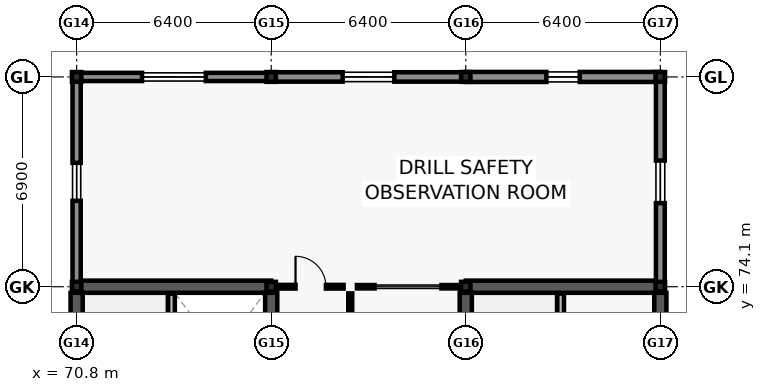
"""IFC4 building model, lengths in metres.
Left out: names, types, materials, properties, quantities, classifications, styles, units other than length and angle.
Written with IfcOpenShell. Run it as: python <this file> out.ifc"""

import sys

from ifc_helpers import new_model, si_unit, direction, frame, frame_2d, origin, origin_2d, place, context, subcontext, project, spatial, rectangle, i_section, extrude, element, fill, save


model = new_model("IFC4")
c1 = context("Model", 3, precision=1e-05, world=origin(), true_north=direction((0.0, 1.0)))
c2 = subcontext(c1, "Body", "Model", "MODEL_VIEW")
j1 = project(units=[si_unit("LENGTHUNIT", "METRE"), si_unit("PLANEANGLEUNIT", "RADIAN")], contexts=[c1])
p1 = place(None, origin())
s1 = spatial("IfcSite", under=j1, at=p1, CompositionType="ELEMENT")
p2 = place(p1, origin())
s2 = spatial("IfcBuilding", under=s1, at=p2, CompositionType="ELEMENT")
p3 = place(p2, frame((0.0, 0.0, 9.6)))
s3 = spatial("IfcBuildingStorey", under=s2, at=p3, CompositionType="ELEMENT", Elevation=9.6)
for number, where, z_axis, x_axis in (
    (1, (70.8, 74.1, 0.0), (0.0, 0.0, 1.0), (1.0, 0.0, 0.0)),
    (2, (70.8, 81.0, 0.0), (0.0, 0.0, 1.0), (1.0, 0.0, 0.0)),
    (3, (77.2, 74.1, 0.0), (0.0, 0.0, 1.0), (1.0, 0.0, 0.0)),
    (4, (77.2, 81.0, 0.0), (0.0, 0.0, 1.0), (1.0, 0.0, 0.0)),
    (5, (83.6, 74.1, 0.0), (0.0, 0.0, 1.0), (1.0, 0.0, 0.0)),
    (6, (83.6, 81.0, 0.0), (0.0, 0.0, 1.0), (1.0, 0.0, 0.0)),
    (7, (90.0, 74.1, 0.0), (0.0, 0.0, 1.0), (1.0, 0.0, 0.0)),
    (8, (90.0, 81.0, 0.0), (0.0, 0.0, 1.0), (1.0, 0.0, 0.0)),
):
    element("IfcColumn", number, at=place(p3, frame(where, z_axis=z_axis, x_axis=x_axis)), inside=s3, PredefinedType="COLUMN", context=c2, shape_type="SweptSolid", body=[
        extrude(i_section(OverallWidth=0.309, OverallDepth=0.321, WebThickness=0.014, FlangeThickness=0.022, FilletRadius=0.017, at=origin_2d()), origin(), (0.0, 0.0, 1.0), 3.9),
    ])
p4 = place(p3, frame((70.8, 74.1, 0.0), z_axis=(0.0, 0.0, 1.0), x_axis=(1.0, 0.0, 0.0)))
e9 = element("IfcWall", 9, at=p4, inside=s3, PredefinedType="SHEAR", context=c2, shape_type="SweptSolid", body=[
    extrude(rectangle(XDim=6.4, YDim=0.4, at=frame_2d((3.2, 0.0))), origin(), (0.0, 0.0, 1.0), 3.66),
])
for number, where, z_axis, x_axis in (
    (10, (70.8, 67.2, 0.0), (0.0, 0.0, 1.0), (0.0, 1.0, 0.0)),
    (11, (77.2, 67.2, 0.0), (0.0, 0.0, 1.0), (0.0, 1.0, 0.0)),
):
    element("IfcWall", number, at=place(p3, frame(where, z_axis=z_axis, x_axis=x_axis)), inside=s3, PredefinedType="SHEAR", context=c2, shape_type="SweptSolid", body=[
        extrude(rectangle(XDim=6.7, YDim=0.4, at=frame_2d((3.35, 0.0))), origin(), (0.0, 0.0, 1.0), 3.66),
    ])
p5 = place(p3, frame((83.6, 74.1, 0.0), z_axis=(0.0, 0.0, 1.0), x_axis=(1.0, 0.0, 0.0)))
e12 = element("IfcWall", 12, at=p5, inside=s3, PredefinedType="SHEAR", context=c2, shape_type="SweptSolid", body=[
    extrude(rectangle(XDim=6.4, YDim=0.4, at=frame_2d((3.2, 0.0))), origin(), (0.0, 0.0, 1.0), 3.66),
])
for number, where, z_axis, x_axis in (
    (13, (83.6, 67.2, 0.0), (0.0, 0.0, 1.0), (0.0, 1.0, 0.0)),
    (14, (90.0, 67.2, 0.0), (0.0, 0.0, 1.0), (0.0, 1.0, 0.0)),
):
    element("IfcWall", number, at=place(p3, frame(where, z_axis=z_axis, x_axis=x_axis)), inside=s3, PredefinedType="SHEAR", context=c2, shape_type="SweptSolid", body=[
        extrude(rectangle(XDim=6.7, YDim=0.4, at=frame_2d((3.35, 0.0))), origin(), (0.0, 0.0, 1.0), 3.66),
    ])
p6 = place(p3, frame((70.805, 81.0, 0.0), z_axis=(0.0, 0.0, 1.0), x_axis=(1.0, 0.0, 0.0)))
e15 = element("IfcWall", 15, at=p6, inside=s3, PredefinedType="SOLIDWALL", context=c2, shape_type="SweptSolid", body=[
    extrude(rectangle(XDim=6.39, YDim=0.27, at=frame_2d((3.195, 0.0))), origin(), (0.0, 0.0, 1.0), 3.02),
])
p7 = place(p6, frame((2.145, 0.0, 0.8)))
e16 = element("IfcOpeningElement", 16, at=p7, cuts=e15, PredefinedType="OPENING", context=c2, shape_type="SweptSolid", body=[
    extrude(rectangle(XDim=2.1, YDim=1.25, at=frame_2d((1.05, 0.625))), frame((0.0, 0.145, 0.0), z_axis=(0.0, -1.0, 0.0), x_axis=(1.0, 0.0, 0.0)), (0.0, 0.0, 1.0), 0.29),
])
p8 = place(p3, frame((77.205, 81.0, 0.0), z_axis=(0.0, 0.0, 1.0), x_axis=(1.0, 0.0, 0.0)))
e17 = element("IfcWall", 17, at=p8, inside=s3, PredefinedType="SOLIDWALL", context=c2, shape_type="SweptSolid", body=[
    extrude(rectangle(XDim=6.39, YDim=0.31, at=frame_2d((3.195, 0.0))), origin(), (0.0, 0.0, 1.0), 3.02),
])
p9 = place(p8, frame((2.345, 0.0, 0.8)))
e18 = element("IfcOpeningElement", 18, at=p9, cuts=e17, PredefinedType="OPENING", context=c2, shape_type="SweptSolid", body=[
    extrude(rectangle(XDim=1.7, YDim=1.25, at=frame_2d((0.85, 0.625))), frame((0.0, 0.165, 0.0), z_axis=(0.0, -1.0, 0.0), x_axis=(1.0, 0.0, 0.0)), (0.0, 0.0, 1.0), 0.33),
])
p10 = place(p3, frame((83.605, 81.0, 0.0), z_axis=(0.0, 0.0, 1.0), x_axis=(1.0, 0.0, 0.0)))
e19 = element("IfcWall", 19, at=p10, inside=s3, PredefinedType="SOLIDWALL", context=c2, shape_type="SweptSolid", body=[
    extrude(rectangle(XDim=6.39, YDim=0.33, at=frame_2d((3.195, 0.0))), origin(), (0.0, 0.0, 1.0), 3.02),
])
p11 = place(p10, frame((2.645, 0.0, 0.8)))
e20 = element("IfcOpeningElement", 20, at=p11, cuts=e19, PredefinedType="OPENING", context=c2, shape_type="SweptSolid", body=[
    extrude(rectangle(XDim=1.1, YDim=1.5, at=frame_2d((0.55, 0.75))), frame((0.0, 0.175, 0.0), z_axis=(0.0, -1.0, 0.0), x_axis=(1.0, 0.0, 0.0)), (0.0, 0.0, 1.0), 0.35),
])
p12 = place(p3, frame((70.8, 74.105, 0.0), z_axis=(0.0, 0.0, 1.0), x_axis=(0.0, 1.0, 0.0)))
e21 = element("IfcWall", 21, at=p12, inside=s3, PredefinedType="SOLIDWALL", context=c2, shape_type="SweptSolid", body=[
    extrude(rectangle(XDim=6.89, YDim=0.27, at=frame_2d((3.445, 0.0))), origin(), (0.0, 0.0, 1.0), 3.02),
])
p13 = place(p12, frame((2.82, 0.0, 0.8)))
e22 = element("IfcOpeningElement", 22, at=p13, cuts=e21, PredefinedType="OPENING", context=c2, shape_type="SweptSolid", body=[
    extrude(rectangle(XDim=1.25, YDim=1.5, at=frame_2d((0.625, 0.75))), frame((0.0, 0.145, 0.0), z_axis=(0.0, -1.0, 0.0), x_axis=(1.0, 0.0, 0.0)), (0.0, 0.0, 1.0), 0.29),
])
p14 = place(p3, frame((90.0, 80.995, 0.0), z_axis=(0.0, 0.0, 1.0), x_axis=(0.0, -1.0, 0.0)))
e23 = element("IfcWall", 23, at=p14, inside=s3, PredefinedType="SOLIDWALL", context=c2, shape_type="SweptSolid", body=[
    extrude(rectangle(XDim=6.89, YDim=0.29, at=frame_2d((3.445, 0.0))), origin(), (0.0, 0.0, 1.0), 3.02),
])
p15 = place(p14, frame((2.745, 0.0, 0.8)))
e24 = element("IfcOpeningElement", 24, at=p15, cuts=e23, PredefinedType="OPENING", context=c2, shape_type="SweptSolid", body=[
    extrude(rectangle(XDim=1.4, YDim=1.5, at=frame_2d((0.7, 0.75))), frame((0.0, 0.155, 0.0), z_axis=(0.0, -1.0, 0.0), x_axis=(1.0, 0.0, 0.0)), (0.0, 0.0, 1.0), 0.31),
])
for number, where, z_axis, x_axis in (
    (25, (73.92, 67.32, 0.0), (0.0, 0.0, 1.0), (0.0, 1.0, 0.0)),
    (26, (86.72, 67.32, 0.0), (0.0, 0.0, 1.0), (0.0, 1.0, 0.0)),
):
    element("IfcWall", number, at=place(p3, frame(where, z_axis=z_axis, x_axis=x_axis)), inside=s3, PredefinedType="SOLIDWALL", context=c2, shape_type="SweptSolid", body=[
        extrude(rectangle(XDim=6.555, YDim=0.22, at=frame_2d((3.277, 0.0))), origin(), (0.0, 0.0, 1.0), 3.66),
    ])
p16 = place(p3, frame((79.8, 67.42, 0.0), z_axis=(0.0, 0.0, 1.0), x_axis=(0.0, 1.0, 0.0)))
e27 = element("IfcWall", 27, at=p16, inside=s3, PredefinedType="PARTITIONING", context=c2, shape_type="SweptSolid", body=[
    extrude(rectangle(XDim=6.46, YDim=0.13, at=frame_2d((3.23, 0.0))), origin(), (0.0, 0.0, 1.0), 3.0),
])
p17 = place(p16, frame((2.745, 0.0, 0.0)))
e28 = element("IfcOpeningElement", 28, at=p17, cuts=e27, PredefinedType="OPENING", context=c2, shape_type="SweptSolid", body=[
    extrude(rectangle(XDim=0.97, YDim=2.1, at=frame_2d((0.485, 1.05))), frame((0.0, 0.075, 0.0), z_axis=(0.0, -1.0, 0.0), x_axis=(1.0, 0.0, 0.0)), (0.0, 0.0, 1.0), 0.15),
])
p18 = place(p3, frame((77.42, 74.1, 0.0), z_axis=(0.0, 0.0, 1.0), x_axis=(1.0, 0.0, 0.0)))
e29 = element("IfcWall", 29, at=p18, inside=s3, PredefinedType="PARTITIONING", context=c2, shape_type="SweptSolid", body=[
    extrude(rectangle(XDim=2.16, YDim=0.12, at=frame_2d((1.08, 0.0))), origin(), (0.0, 0.0, 1.0), 3.0),
])
p19 = place(p18, frame((0.58, 0.0, 0.0)))
e30 = element("IfcOpeningElement", 30, at=p19, cuts=e29, PredefinedType="OPENING", context=c2, shape_type="SweptSolid", body=[
    extrude(rectangle(XDim=1.0, YDim=2.12, at=frame_2d((0.5, 1.06))), frame((0.0, 0.07, 0.0), z_axis=(0.0, -1.0, 0.0), x_axis=(1.0, 0.0, 0.0)), (0.0, 0.0, 1.0), 0.14),
])
p20 = place(p3, frame((80.02, 74.1, 0.0), z_axis=(0.0, 0.0, 1.0), x_axis=(1.0, 0.0, 0.0)))
e31 = element("IfcWall", 31, at=p20, inside=s3, PredefinedType="PARTITIONING", context=c2, shape_type="SweptSolid", body=[
    extrude(rectangle(XDim=3.36, YDim=0.11, at=frame_2d((1.68, 0.0))), origin(), (0.0, 0.0, 1.0), 3.0),
])
p21 = place(p20, frame((0.58, 0.0, 0.95)))
e32 = element("IfcOpeningElement", 32, at=p21, cuts=e31, PredefinedType="OPENING", context=c2, shape_type="SweptSolid", body=[
    extrude(rectangle(XDim=2.2, YDim=1.3, at=frame_2d((1.1, 0.65))), frame((0.0, 0.065, 0.0), z_axis=(0.0, -1.0, 0.0), x_axis=(1.0, 0.0, 0.0)), (0.0, 0.0, 1.0), 0.13),
])
p22 = place(p7, origin())
e33 = element("IfcWindow", 33, at=p22, inside=s3, PartitioningType="DOUBLE_PANEL_VERTICAL", PredefinedType="WINDOW", context=c2, shape_type="SweptSolid", body=[
    extrude(rectangle(XDim=2.1, YDim=1.25, at=frame_2d((1.05, 0.625))), frame((0.0, 0.03, 0.0), z_axis=(0.0, -1.0, 0.0), x_axis=(1.0, 0.0, 0.0)), (0.0, 0.0, 1.0), 0.06),
])
fill(e16, e33)
p23 = place(p9, origin())
e34 = element("IfcWindow", 34, at=p23, inside=s3, PartitioningType="DOUBLE_PANEL_VERTICAL", PredefinedType="WINDOW", context=c2, shape_type="SweptSolid", body=[
    extrude(rectangle(XDim=1.7, YDim=1.25, at=frame_2d((0.85, 0.625))), frame((0.0, 0.03, 0.0), z_axis=(0.0, -1.0, 0.0), x_axis=(1.0, 0.0, 0.0)), (0.0, 0.0, 1.0), 0.06),
])
fill(e18, e34)
p24 = place(p11, origin())
e35 = element("IfcWindow", 35, at=p24, inside=s3, PartitioningType="SINGLE_PANEL", PredefinedType="WINDOW", context=c2, shape_type="SweptSolid", body=[
    extrude(rectangle(XDim=1.1, YDim=1.5, at=frame_2d((0.55, 0.75))), frame((0.0, 0.03, 0.0), z_axis=(0.0, -1.0, 0.0), x_axis=(1.0, 0.0, 0.0)), (0.0, 0.0, 1.0), 0.06),
])
fill(e20, e35)
p25 = place(p13, origin())
e36 = element("IfcWindow", 36, at=p25, inside=s3, PartitioningType="SINGLE_PANEL", PredefinedType="WINDOW", context=c2, shape_type="SweptSolid", body=[
    extrude(rectangle(XDim=1.25, YDim=1.5, at=frame_2d((0.625, 0.75))), frame((0.0, 0.03, 0.0), z_axis=(0.0, -1.0, 0.0), x_axis=(1.0, 0.0, 0.0)), (0.0, 0.0, 1.0), 0.06),
])
fill(e22, e36)
p26 = place(p15, origin())
e37 = element("IfcWindow", 37, at=p26, inside=s3, PartitioningType="SINGLE_PANEL", PredefinedType="WINDOW", context=c2, shape_type="SweptSolid", body=[
    extrude(rectangle(XDim=1.4, YDim=1.5, at=frame_2d((0.7, 0.75))), frame((0.0, 0.03, 0.0), z_axis=(0.0, -1.0, 0.0), x_axis=(1.0, 0.0, 0.0)), (0.0, 0.0, 1.0), 0.06),
])
fill(e24, e37)
p27 = place(p19, origin())
e38 = element("IfcDoor", 38, at=p27, inside=s3, OperationType="SINGLE_SWING_LEFT", PredefinedType="DOOR", context=c2, shape_type="SweptSolid", body=[
    extrude(rectangle(XDim=1.0, YDim=2.12, at=frame_2d((0.5, 1.06))), frame((0.0, 0.025, 0.0), z_axis=(0.0, -1.0, 0.0), x_axis=(1.0, 0.0, 0.0)), (0.0, 0.0, 1.0), 0.05),
])
fill(e30, e38)
p28 = place(p21, origin())
e39 = element("IfcWindow", 39, at=p28, inside=s3, PartitioningType="DOUBLE_PANEL_VERTICAL", PredefinedType="WINDOW", context=c2, shape_type="SweptSolid", body=[
    extrude(rectangle(XDim=2.2, YDim=1.3, at=frame_2d((1.1, 0.65))), frame((0.0, 0.03, 0.0), z_axis=(0.0, -1.0, 0.0), x_axis=(1.0, 0.0, 0.0)), (0.0, 0.0, 1.0), 0.06),
])
fill(e32, e39)
save(model, sys.argv[1])
